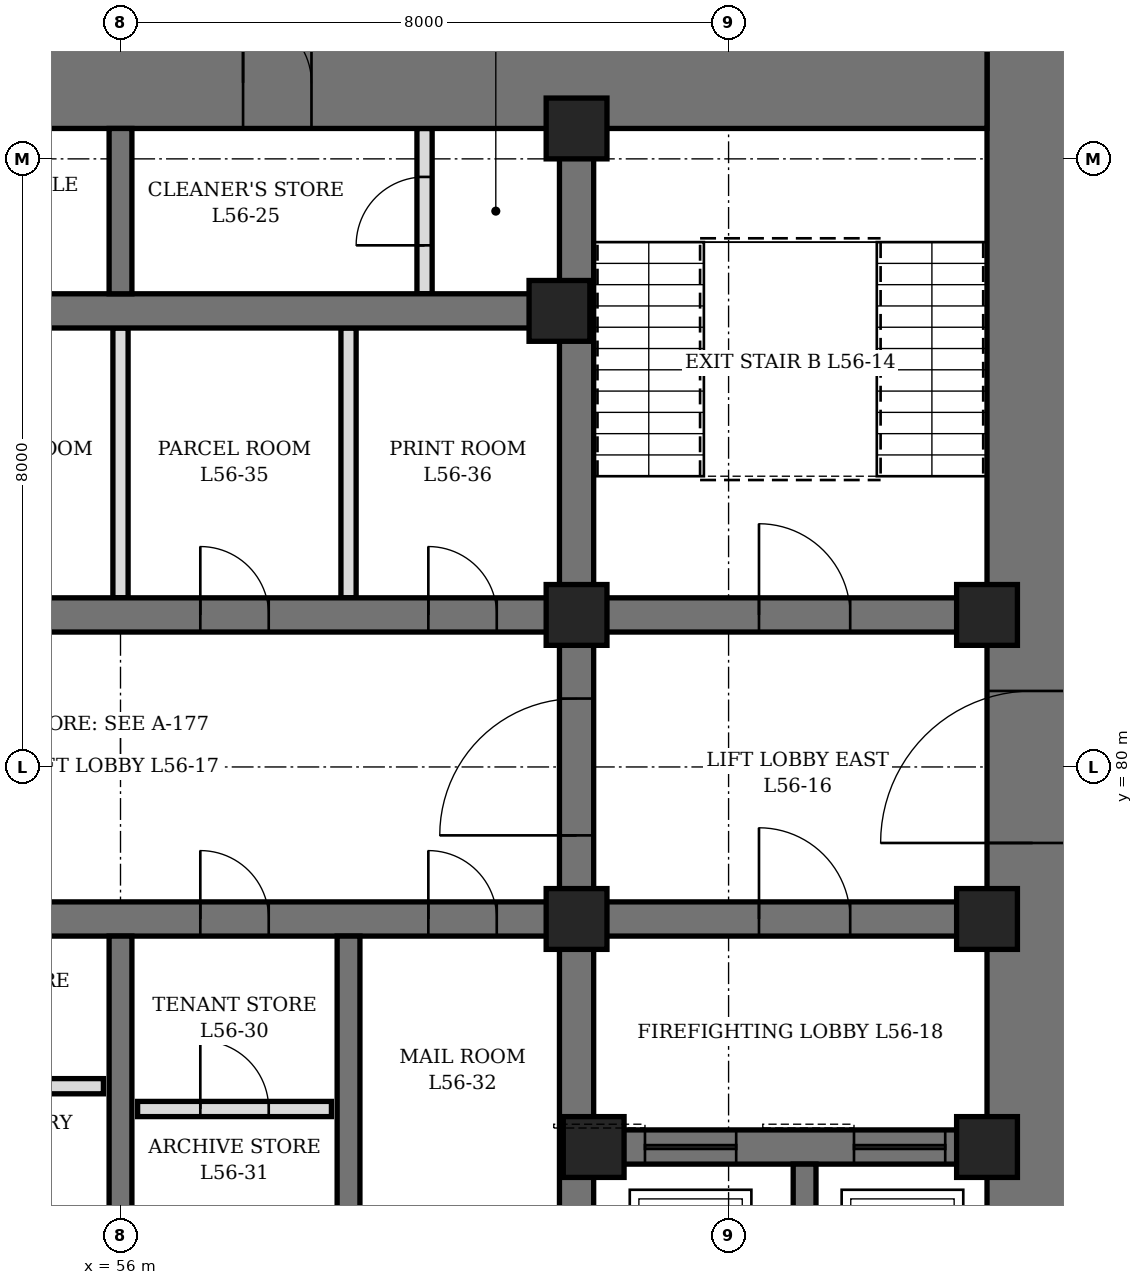
"""IFC4 building model, lengths in metres.
Left out: names, types, materials, properties, quantities, classifications, styles, units other than length and angle.
Written with IfcOpenShell. Run it as: python <this file> out.ifc"""

import sys

from ifc_helpers import new_model, si_unit, direction, frame, frame_2d, origin, origin_2d, place, context, subcontext, project, spatial, rectangle, hollow_rectangle, extrude, element, fill, save


model = new_model("IFC4")
c1 = context("Model", 3, precision=1e-05, world=origin(), true_north=direction((0.0, 1.0)))
c2 = subcontext(c1, "Body", "Model", "MODEL_VIEW")
j1 = project(units=[si_unit("LENGTHUNIT", "METRE"), si_unit("PLANEANGLEUNIT", "RADIAN")], contexts=[c1])
p1 = place(None, origin())
s1 = spatial("IfcSite", under=j1, at=p1, CompositionType="ELEMENT")
p2 = place(p1, origin())
s2 = spatial("IfcBuilding", under=s1, at=p2, CompositionType="ELEMENT")
p3 = place(p2, frame((0.0, 0.0, 250.3)))
s3 = spatial("IfcBuildingStorey", under=s2, at=p3, CompositionType="ELEMENT", Elevation=250.3)
p4 = place(p3, frame((68.0, 70.4, 0.0), z_axis=(0.0, 0.0, 1.0), x_axis=(0.0, 1.0, 0.0)))
e1 = element("IfcWall", 1, at=p4, inside=s3, PredefinedType="SHEAR", context=c2, shape_type="SweptSolid", body=[
    extrude(rectangle(XDim=19.2, YDim=1.2, at=frame_2d((9.6, 0.0))), origin(), (0.0, 0.0, 1.0), 4.2),
])
p5 = place(p4, frame((8.6, 0.0, 0.0)))
e2 = element("IfcOpeningElement", 2, at=p5, cuts=e1, PredefinedType="OPENING", context=c2, shape_type="SweptSolid", body=[
    extrude(rectangle(XDim=2.0, YDim=2.4, at=frame_2d((1.0, 1.2))), frame((0.0, 0.61, 0.0), z_axis=(0.0, -1.0, 0.0), x_axis=(1.0, 0.0, 0.0)), (0.0, 0.0, 1.0), 1.22),
])
p6 = place(p3, frame((44.6, 89.0, 0.0), z_axis=(0.0, 0.0, 1.0), x_axis=(1.0, 0.0, 0.0)))
e3 = element("IfcWall", 3, at=p6, inside=s3, PredefinedType="SHEAR", context=c2, shape_type="SweptSolid", body=[
    extrude(rectangle(XDim=22.8, YDim=1.2, at=frame_2d((11.4, 0.0))), origin(), (0.0, 0.0, 1.0), 4.2),
])
p7 = place(p6, frame((9.475, 0.0, 0.0)))
e4 = element("IfcOpeningElement", 4, at=p7, cuts=e3, PredefinedType="OPENING", context=c2, shape_type="SweptSolid", body=[
    extrude(rectangle(XDim=1.0, YDim=2.1, at=frame_2d((0.5, 1.05))), frame((0.0, 0.61, 0.0), z_axis=(0.0, -1.0, 0.0), x_axis=(1.0, 0.0, 0.0)), (0.0, 0.0, 1.0), 1.22),
])
p8 = place(p6, frame((6.65, 0.0, 0.0)))
e5 = element("IfcOpeningElement", 5, at=p8, cuts=e3, PredefinedType="OPENING", context=c2, shape_type="SweptSolid", body=[
    extrude(rectangle(XDim=0.9, YDim=2.1, at=frame_2d((0.45, 1.05))), frame((0.0, 0.61, 0.0), z_axis=(0.0, -1.0, 0.0), x_axis=(1.0, 0.0, 0.0)), (0.0, 0.0, 1.0), 1.22),
])
p9 = place(p6, frame((13.012, 0.0, 0.0)))
e6 = element("IfcOpeningElement", 6, at=p9, cuts=e3, PredefinedType="OPENING", context=c2, shape_type="SweptSolid", body=[
    extrude(rectangle(XDim=0.9, YDim=2.1, at=frame_2d((0.45, 1.05))), frame((0.0, 0.61, 0.0), z_axis=(0.0, -1.0, 0.0), x_axis=(1.0, 0.0, 0.0)), (0.0, 0.0, 1.0), 1.22),
])
p10 = place(p3, frame((62.0, 71.6, 0.0), z_axis=(0.0, 0.0, 1.0), x_axis=(0.0, 1.0, 0.0)))
e7 = element("IfcWall", 7, at=p10, inside=s3, PredefinedType="SHEAR", context=c2, shape_type="SweptSolid", body=[
    extrude(rectangle(XDim=16.8, YDim=0.45, at=frame_2d((8.4, 0.0))), origin(), (0.0, 0.0, 1.0), 4.2),
])
p11 = place(p10, frame((7.5, 0.0, 0.0)))
e8 = element("IfcOpeningElement", 8, at=p11, cuts=e7, PredefinedType="OPENING", context=c2, shape_type="SweptSolid", body=[
    extrude(rectangle(XDim=1.8, YDim=2.4, at=frame_2d((0.9, 1.2))), frame((0.0, 0.235, 0.0), z_axis=(0.0, -1.0, 0.0), x_axis=(1.0, 0.0, 0.0)), (0.0, 0.0, 1.0), 0.47),
])
p12 = place(p3, frame((62.225, 75.0, 0.0), z_axis=(0.0, 0.0, 1.0), x_axis=(1.0, 0.0, 0.0)))
e9 = element("IfcWall", 9, at=p12, inside=s3, PredefinedType="SHEAR", context=c2, shape_type="SweptSolid", body=[
    extrude(rectangle(XDim=5.175, YDim=0.45, at=frame_2d((2.587, 0.0))), origin(), (0.0, 0.0, 1.0), 4.2),
])
p13 = place(p12, frame((0.675, 0.0, 0.0)))
e10 = element("IfcOpeningElement", 10, at=p13, cuts=e9, PredefinedType="OPENING", context=c2, shape_type="SweptSolid", body=[
    extrude(rectangle(XDim=1.2, YDim=2.2, at=frame_2d((0.6, 1.1))), frame((0.0, 0.235, 0.0), z_axis=(0.0, -1.0, 0.0), x_axis=(1.0, 0.0, 0.0)), (0.0, 0.0, 1.0), 0.47),
])
p14 = place(p12, frame((3.425, 0.0, 0.0)))
e11 = element("IfcOpeningElement", 11, at=p14, cuts=e9, PredefinedType="OPENING", context=c2, shape_type="SweptSolid", body=[
    extrude(rectangle(XDim=1.2, YDim=2.2, at=frame_2d((0.6, 1.1))), frame((0.0, 0.235, 0.0), z_axis=(0.0, -1.0, 0.0), x_axis=(1.0, 0.0, 0.0)), (0.0, 0.0, 1.0), 0.47),
])
p15 = place(p3, frame((62.225, 78.0, 0.0), z_axis=(0.0, 0.0, 1.0), x_axis=(1.0, 0.0, 0.0)))
e12 = element("IfcWall", 12, at=p15, inside=s3, PredefinedType="SHEAR", context=c2, shape_type="SweptSolid", body=[
    extrude(rectangle(XDim=5.175, YDim=0.45, at=frame_2d((2.587, 0.0))), origin(), (0.0, 0.0, 1.0), 4.2),
])
p16 = place(p15, frame((2.175, 0.0, 0.0)))
e13 = element("IfcOpeningElement", 13, at=p16, cuts=e12, PredefinedType="OPENING", context=c2, shape_type="SweptSolid", body=[
    extrude(rectangle(XDim=1.2, YDim=2.1, at=frame_2d((0.6, 1.05))), frame((0.0, 0.235, 0.0), z_axis=(0.0, -1.0, 0.0), x_axis=(1.0, 0.0, 0.0)), (0.0, 0.0, 1.0), 0.47),
])
p17 = place(p3, frame((62.225, 82.0, 0.0), z_axis=(0.0, 0.0, 1.0), x_axis=(1.0, 0.0, 0.0)))
e14 = element("IfcWall", 14, at=p17, inside=s3, PredefinedType="SHEAR", context=c2, shape_type="SweptSolid", body=[
    extrude(rectangle(XDim=5.175, YDim=0.45, at=frame_2d((2.587, 0.0))), origin(), (0.0, 0.0, 1.0), 4.2),
])
p18 = place(p17, frame((2.175, 0.0, 0.0)))
e15 = element("IfcOpeningElement", 15, at=p18, cuts=e14, PredefinedType="OPENING", context=c2, shape_type="SweptSolid", body=[
    extrude(rectangle(XDim=1.2, YDim=2.1, at=frame_2d((0.6, 1.05))), frame((0.0, 0.235, 0.0), z_axis=(0.0, -1.0, 0.0), x_axis=(1.0, 0.0, 0.0)), (0.0, 0.0, 1.0), 0.47),
])
p19 = place(p3, frame((50.225, 78.0, 0.0), z_axis=(0.0, 0.0, 1.0), x_axis=(1.0, 0.0, 0.0)))
e16 = element("IfcWall", 16, at=p19, inside=s3, PredefinedType="SHEAR", context=c2, shape_type="SweptSolid", body=[
    extrude(rectangle(XDim=11.55, YDim=0.45, at=frame_2d((5.775, 0.0))), origin(), (0.0, 0.0, 1.0), 4.2),
])
p20 = place(p19, frame((0.825, 0.0, 0.0)))
e17 = element("IfcOpeningElement", 17, at=p20, cuts=e16, PredefinedType="OPENING", context=c2, shape_type="SweptSolid", body=[
    extrude(rectangle(XDim=0.9, YDim=2.1, at=frame_2d((0.45, 1.05))), frame((0.0, 0.235, 0.0), z_axis=(0.0, -1.0, 0.0), x_axis=(1.0, 0.0, 0.0)), (0.0, 0.0, 1.0), 0.47),
])
p21 = place(p19, frame((3.825, 0.0, 0.0)))
e18 = element("IfcOpeningElement", 18, at=p21, cuts=e16, PredefinedType="OPENING", context=c2, shape_type="SweptSolid", body=[
    extrude(rectangle(XDim=0.9, YDim=2.1, at=frame_2d((0.45, 1.05))), frame((0.0, 0.235, 0.0), z_axis=(0.0, -1.0, 0.0), x_axis=(1.0, 0.0, 0.0)), (0.0, 0.0, 1.0), 0.47),
])
p22 = place(p19, frame((6.825, 0.0, 0.0)))
e19 = element("IfcOpeningElement", 19, at=p22, cuts=e16, PredefinedType="OPENING", context=c2, shape_type="SweptSolid", body=[
    extrude(rectangle(XDim=0.9, YDim=2.1, at=frame_2d((0.45, 1.05))), frame((0.0, 0.235, 0.0), z_axis=(0.0, -1.0, 0.0), x_axis=(1.0, 0.0, 0.0)), (0.0, 0.0, 1.0), 0.47),
])
p23 = place(p19, frame((9.825, 0.0, 0.0)))
e20 = element("IfcOpeningElement", 20, at=p23, cuts=e16, PredefinedType="OPENING", context=c2, shape_type="SweptSolid", body=[
    extrude(rectangle(XDim=0.9, YDim=2.1, at=frame_2d((0.45, 1.05))), frame((0.0, 0.235, 0.0), z_axis=(0.0, -1.0, 0.0), x_axis=(1.0, 0.0, 0.0)), (0.0, 0.0, 1.0), 0.47),
])
p24 = place(p3, frame((50.225, 82.0, 0.0), z_axis=(0.0, 0.0, 1.0), x_axis=(1.0, 0.0, 0.0)))
e21 = element("IfcWall", 21, at=p24, inside=s3, PredefinedType="SHEAR", context=c2, shape_type="SweptSolid", body=[
    extrude(rectangle(XDim=11.55, YDim=0.45, at=frame_2d((5.775, 0.0))), origin(), (0.0, 0.0, 1.0), 4.2),
])
p25 = place(p24, frame((0.825, 0.0, 0.0)))
e22 = element("IfcOpeningElement", 22, at=p25, cuts=e21, PredefinedType="OPENING", context=c2, shape_type="SweptSolid", body=[
    extrude(rectangle(XDim=0.9, YDim=2.1, at=frame_2d((0.45, 1.05))), frame((0.0, 0.235, 0.0), z_axis=(0.0, -1.0, 0.0), x_axis=(1.0, 0.0, 0.0)), (0.0, 0.0, 1.0), 0.47),
])
p26 = place(p24, frame((3.825, 0.0, 0.0)))
e23 = element("IfcOpeningElement", 23, at=p26, cuts=e21, PredefinedType="OPENING", context=c2, shape_type="SweptSolid", body=[
    extrude(rectangle(XDim=0.9, YDim=2.1, at=frame_2d((0.45, 1.05))), frame((0.0, 0.235, 0.0), z_axis=(0.0, -1.0, 0.0), x_axis=(1.0, 0.0, 0.0)), (0.0, 0.0, 1.0), 0.47),
])
p27 = place(p24, frame((6.825, 0.0, 0.0)))
e24 = element("IfcOpeningElement", 24, at=p27, cuts=e21, PredefinedType="OPENING", context=c2, shape_type="SweptSolid", body=[
    extrude(rectangle(XDim=0.9, YDim=2.1, at=frame_2d((0.45, 1.05))), frame((0.0, 0.235, 0.0), z_axis=(0.0, -1.0, 0.0), x_axis=(1.0, 0.0, 0.0)), (0.0, 0.0, 1.0), 0.47),
])
p28 = place(p24, frame((9.825, 0.0, 0.0)))
e25 = element("IfcOpeningElement", 25, at=p28, cuts=e21, PredefinedType="OPENING", context=c2, shape_type="SweptSolid", body=[
    extrude(rectangle(XDim=0.9, YDim=2.1, at=frame_2d((0.45, 1.05))), frame((0.0, 0.235, 0.0), z_axis=(0.0, -1.0, 0.0), x_axis=(1.0, 0.0, 0.0)), (0.0, 0.0, 1.0), 0.47),
])
p29 = place(p3, frame((50.225, 86.0, 0.0), z_axis=(0.0, 0.0, 1.0), x_axis=(1.0, 0.0, 0.0)))
e26 = element("IfcWall", 26, at=p29, inside=s3, PredefinedType="SHEAR", context=c2, shape_type="SweptSolid", body=[
    extrude(rectangle(XDim=11.55, YDim=0.45, at=frame_2d((5.775, 0.0))), origin(), (0.0, 0.0, 1.0), 4.2),
])
for number, where, z_axis, x_axis in (
    (27, (56.0, 74.15, 0.0), (0.0, 0.0, 1.0), (0.0, 1.0, 0.0)),
    (28, (59.0, 74.15, 0.0), (0.0, 0.0, 1.0), (0.0, 1.0, 0.0)),
):
    element("IfcWall", number, at=place(p3, frame(where, z_axis=z_axis, x_axis=x_axis)), inside=s3, PredefinedType="SHEAR", context=c2, shape_type="SweptSolid", body=[
        extrude(rectangle(XDim=3.625, YDim=0.3, at=frame_2d((1.812, 0.0))), origin(), (0.0, 0.0, 1.0), 4.2),
    ])
p30 = place(p3, frame((65.0, 71.6, 0.0), z_axis=(0.0, 0.0, 1.0), x_axis=(0.0, 1.0, 0.0)))
e29 = element("IfcWall", 29, at=p30, inside=s3, PredefinedType="SHEAR", context=c2, shape_type="SweptSolid", body=[
    extrude(rectangle(XDim=3.175, YDim=0.3, at=frame_2d((1.587, 0.0))), origin(), (0.0, 0.0, 1.0), 4.2),
])
p31 = place(p3, frame((56.0, 86.225, 0.0), z_axis=(0.0, 0.0, 1.0), x_axis=(0.0, 1.0, 0.0)))
e30 = element("IfcWall", 30, at=p31, inside=s3, PredefinedType="SHEAR", context=c2, shape_type="SweptSolid", body=[
    extrude(rectangle(XDim=2.175, YDim=0.3, at=frame_2d((1.087, 0.0))), origin(), (0.0, 0.0, 1.0), 4.2),
])
for number, where, z_axis, x_axis in (
    (31, (61.775, 86.0, 0.0), (0.0, 0.0, 1.0), (1.0, 0.0, 0.0)),
    (32, (62.0, 78.0, 0.0), (0.0, 0.0, 1.0), (1.0, 0.0, 0.0)),
    (33, (62.0, 82.0, 0.0), (0.0, 0.0, 1.0), (1.0, 0.0, 0.0)),
    (34, (62.0, 88.4, 0.0), (0.0, 0.0, 1.0), (1.0, 0.0, 0.0)),
    (35, (62.225, 75.0, 0.0), (0.0, 0.0, 1.0), (1.0, 0.0, 0.0)),
    (36, (67.4, 75.0, 0.0), (0.0, 0.0, 1.0), (1.0, 0.0, 0.0)),
    (37, (67.4, 78.0, 0.0), (0.0, 0.0, 1.0), (1.0, 0.0, 0.0)),
    (38, (67.4, 82.0, 0.0), (0.0, 0.0, 1.0), (1.0, 0.0, 0.0)),
):
    element("IfcColumn", number, at=place(p3, frame(where, z_axis=z_axis, x_axis=x_axis)), inside=s3, PredefinedType="COLUMN", context=c2, shape_type="SweptSolid", body=[
        extrude(hollow_rectangle(XDim=0.8, YDim=0.8, WallThickness=0.1, at=origin_2d()), origin(), (0.0, 0.0, 1.0), 4.2),
    ])
p32 = place(p3, frame((60.0, 86.225, 0.0), z_axis=(0.0, 0.0, 1.0), x_axis=(0.0, 1.0, 0.0)))
e39 = element("IfcWall", 39, at=p32, inside=s3, PredefinedType="PARTITIONING", context=c2, shape_type="SweptSolid", body=[
    extrude(rectangle(XDim=2.175, YDim=0.2, at=frame_2d((1.087, 0.0))), origin(), (0.0, 0.0, 1.0), 4.04),
])
p33 = place(p32, frame((0.637, 0.0, 0.0)))
e40 = element("IfcOpeningElement", 40, at=p33, cuts=e39, PredefinedType="OPENING", context=c2, shape_type="SweptSolid", body=[
    extrude(rectangle(XDim=0.9, YDim=2.1, at=frame_2d((0.45, 1.05))), frame((0.0, 0.11, 0.0), z_axis=(0.0, -1.0, 0.0), x_axis=(1.0, 0.0, 0.0)), (0.0, 0.0, 1.0), 0.22),
])
p34 = place(p3, frame((53.225, 75.8, 0.0), z_axis=(0.0, 0.0, 1.0), x_axis=(1.0, 0.0, 0.0)))
e41 = element("IfcWall", 41, at=p34, inside=s3, PredefinedType="PARTITIONING", context=c2, shape_type="SweptSolid", body=[
    extrude(rectangle(XDim=2.55, YDim=0.2, at=frame_2d((1.275, 0.0))), origin(), (0.0, 0.0, 1.0), 4.04),
])
p35 = place(p34, frame((0.825, 0.0, 0.0)))
e42 = element("IfcOpeningElement", 42, at=p35, cuts=e41, PredefinedType="OPENING", context=c2, shape_type="SweptSolid", body=[
    extrude(rectangle(XDim=0.9, YDim=2.1, at=frame_2d((0.45, 1.05))), frame((0.0, 0.11, 0.0), z_axis=(0.0, -1.0, 0.0), x_axis=(1.0, 0.0, 0.0)), (0.0, 0.0, 1.0), 0.22),
])
p36 = place(p3, frame((56.225, 75.5, 0.0), z_axis=(0.0, 0.0, 1.0), x_axis=(1.0, 0.0, 0.0)))
e43 = element("IfcWall", 43, at=p36, inside=s3, PredefinedType="PARTITIONING", context=c2, shape_type="SweptSolid", body=[
    extrude(rectangle(XDim=2.55, YDim=0.2, at=frame_2d((1.275, 0.0))), origin(), (0.0, 0.0, 1.0), 4.04),
])
p37 = place(p36, frame((0.825, 0.0, 0.0)))
e44 = element("IfcOpeningElement", 44, at=p37, cuts=e43, PredefinedType="OPENING", context=c2, shape_type="SweptSolid", body=[
    extrude(rectangle(XDim=0.9, YDim=2.1, at=frame_2d((0.45, 1.05))), frame((0.0, 0.11, 0.0), z_axis=(0.0, -1.0, 0.0), x_axis=(1.0, 0.0, 0.0)), (0.0, 0.0, 1.0), 0.22),
])
p38 = place(p3, frame((56.0, 82.225, 0.0), z_axis=(0.0, 0.0, 1.0), x_axis=(0.0, 1.0, 0.0)))
e45 = element("IfcWall", 45, at=p38, inside=s3, PredefinedType="PARTITIONING", context=c2, shape_type="SweptSolid", body=[
    extrude(rectangle(XDim=3.55, YDim=0.2, at=frame_2d((1.775, 0.0))), origin(), (0.0, 0.0, 1.0), 3.14),
])
p39 = place(p3, frame((59.0, 82.225, 0.0), z_axis=(0.0, 0.0, 1.0), x_axis=(0.0, 1.0, 0.0)))
e46 = element("IfcWall", 46, at=p39, inside=s3, PredefinedType="PARTITIONING", context=c2, shape_type="SweptSolid", body=[
    extrude(rectangle(XDim=3.55, YDim=0.2, at=frame_2d((1.775, 0.0))), origin(), (0.0, 0.0, 1.0), 4.04),
])
p40 = place(p9, origin())
e47 = element("IfcDoor", 47, at=p40, inside=s3, OperationType="SINGLE_SWING_LEFT", PredefinedType="DOOR", context=c2, shape_type="SweptSolid", body=[
    extrude(rectangle(XDim=0.9, YDim=2.1, at=frame_2d((0.45, 1.05))), frame((0.0, 0.35, 0.0), z_axis=(0.0, -1.0, 0.0), x_axis=(1.0, 0.0, 0.0)), (0.0, 0.0, 1.0), 0.7),
])
fill(e6, e47)
p41 = place(p33, origin())
e48 = element("IfcDoor", 48, at=p41, inside=s3, OperationType="SINGLE_SWING_LEFT", PredefinedType="DOOR", context=c2, shape_type="SweptSolid", body=[
    extrude(rectangle(XDim=0.9, YDim=2.1, at=frame_2d((0.45, 1.05))), frame((0.0, 0.1, 0.0), z_axis=(0.0, -1.0, 0.0), x_axis=(1.0, 0.0, 0.0)), (0.0, 0.0, 1.0), 0.199),
])
fill(e40, e48)
p42 = place(p22, origin())
e49 = element("IfcDoor", 49, at=p42, inside=s3, OperationType="SINGLE_SWING_LEFT", PredefinedType="DOOR", context=c2, shape_type="SweptSolid", body=[
    extrude(rectangle(XDim=0.9, YDim=2.1, at=frame_2d((0.45, 1.05))), frame((0.0, 0.225, 0.0), z_axis=(0.0, -1.0, 0.0), x_axis=(1.0, 0.0, 0.0)), (0.0, 0.0, 1.0), 0.449),
])
fill(e19, e49)
p43 = place(p37, origin())
e50 = element("IfcDoor", 50, at=p43, inside=s3, OperationType="SINGLE_SWING_LEFT", PredefinedType="DOOR", context=c2, shape_type="SweptSolid", body=[
    extrude(rectangle(XDim=0.9, YDim=2.1, at=frame_2d((0.45, 1.05))), frame((0.0, 0.1, 0.0), z_axis=(0.0, -1.0, 0.0), x_axis=(1.0, 0.0, 0.0)), (0.0, 0.0, 1.0), 0.199),
])
fill(e44, e50)
p44 = place(p23, origin())
e51 = element("IfcDoor", 51, at=p44, inside=s3, OperationType="SINGLE_SWING_LEFT", PredefinedType="DOOR", context=c2, shape_type="SweptSolid", body=[
    extrude(rectangle(XDim=0.9, YDim=2.1, at=frame_2d((0.45, 1.05))), frame((0.0, 0.225, 0.0), z_axis=(0.0, -1.0, 0.0), x_axis=(1.0, 0.0, 0.0)), (0.0, 0.0, 1.0), 0.449),
])
fill(e20, e51)
p45 = place(p27, origin())
e52 = element("IfcDoor", 52, at=p45, inside=s3, OperationType="SINGLE_SWING_LEFT", PredefinedType="DOOR", context=c2, shape_type="SweptSolid", body=[
    extrude(rectangle(XDim=0.9, YDim=2.1, at=frame_2d((0.45, 1.05))), frame((0.0, 0.225, 0.0), z_axis=(0.0, -1.0, 0.0), x_axis=(1.0, 0.0, 0.0)), (0.0, 0.0, 1.0), 0.449),
])
fill(e24, e52)
p46 = place(p28, origin())
e53 = element("IfcDoor", 53, at=p46, inside=s3, OperationType="SINGLE_SWING_LEFT", PredefinedType="DOOR", context=c2, shape_type="SweptSolid", body=[
    extrude(rectangle(XDim=0.9, YDim=2.1, at=frame_2d((0.45, 1.05))), frame((0.0, 0.225, 0.0), z_axis=(0.0, -1.0, 0.0), x_axis=(1.0, 0.0, 0.0)), (0.0, 0.0, 1.0), 0.449),
])
fill(e25, e53)
p47 = place(p18, origin())
e54 = element("IfcDoor", 54, at=p47, inside=s3, OperationType="SINGLE_SWING_LEFT", PredefinedType="DOOR", context=c2, shape_type="SweptSolid", body=[
    extrude(rectangle(XDim=1.2, YDim=2.1, at=frame_2d((0.6, 1.05))), frame((0.0, 0.225, 0.0), z_axis=(0.0, -1.0, 0.0), x_axis=(1.0, 0.0, 0.0)), (0.0, 0.0, 1.0), 0.449),
])
fill(e15, e54)
p48 = place(p5, origin())
e55 = element("IfcDoor", 55, at=p48, inside=s3, OperationType="DOUBLE_DOOR_SINGLE_SWING", PredefinedType="DOOR", context=c2, shape_type="SweptSolid", body=[
    extrude(rectangle(XDim=2.0, YDim=2.4, at=frame_2d((1.0, 1.2))), frame((0.0, 0.35, 0.0), z_axis=(0.0, -1.0, 0.0), x_axis=(1.0, 0.0, 0.0)), (0.0, 0.0, 1.0), 0.7),
])
fill(e2, e55)
p49 = place(p11, origin())
e56 = element("IfcDoor", 56, at=p49, inside=s3, OperationType="DOUBLE_DOOR_SINGLE_SWING", PredefinedType="DOOR", context=c2, shape_type="SweptSolid", body=[
    extrude(rectangle(XDim=1.8, YDim=2.4, at=frame_2d((0.9, 1.2))), frame((0.0, 0.225, 0.0), z_axis=(0.0, -1.0, 0.0), x_axis=(1.0, 0.0, 0.0)), (0.0, 0.0, 1.0), 0.449),
])
fill(e8, e56)
p50 = place(p16, origin())
e57 = element("IfcDoor", 57, at=p50, inside=s3, OperationType="SINGLE_SWING_RIGHT", PredefinedType="DOOR", context=c2, shape_type="SweptSolid", body=[
    extrude(rectangle(XDim=1.2, YDim=2.1, at=frame_2d((0.6, 1.05))), frame((0.0, 0.225, 0.0), z_axis=(0.0, -1.0, 0.0), x_axis=(1.0, 0.0, 0.0)), (0.0, 0.0, 1.0), 0.449),
])
fill(e13, e57)
p51 = place(p13, origin())
e58 = element("IfcDoor", 58, at=p51, inside=s3, OperationType="SLIDING_TO_LEFT", PredefinedType="DOOR", context=c2, shape_type="SweptSolid", body=[
    extrude(rectangle(XDim=1.2, YDim=2.2, at=frame_2d((0.6, 1.1))), frame((0.0, 0.225, 0.0), z_axis=(0.0, -1.0, 0.0), x_axis=(1.0, 0.0, 0.0)), (0.0, 0.0, 1.0), 0.449),
])
fill(e10, e58)
p52 = place(p14, origin())
e59 = element("IfcDoor", 59, at=p52, inside=s3, OperationType="SLIDING_TO_LEFT", PredefinedType="DOOR", context=c2, shape_type="SweptSolid", body=[
    extrude(rectangle(XDim=1.2, YDim=2.2, at=frame_2d((0.6, 1.1))), frame((0.0, 0.225, 0.0), z_axis=(0.0, -1.0, 0.0), x_axis=(1.0, 0.0, 0.0)), (0.0, 0.0, 1.0), 0.449),
])
fill(e11, e59)
save(model, sys.argv[1])
